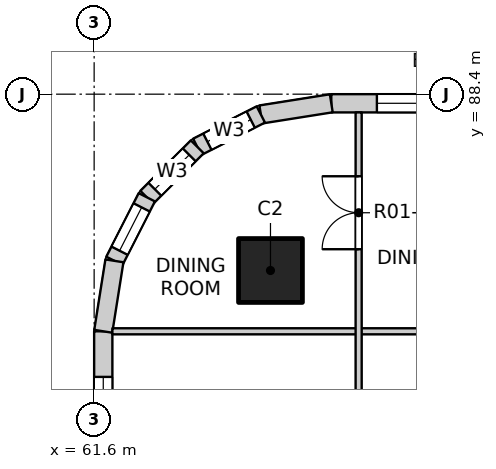
"""IFC4 building model, lengths in metres.
Left out: names, types, materials, properties, quantities, classifications, styles, units other than length and angle.
Written with IfcOpenShell. Run it as: python <this file> out.ifc"""

import sys

from ifc_helpers import new_model, si_unit, direction, frame, frame_2d, origin, origin_2d, place, context, subcontext, project, spatial, rectangle, extrude, element, fill, save


model = new_model("IFC4")
c1 = context("Model", 3, precision=1e-05, world=origin(), true_north=direction((0.0, 1.0)))
c2 = subcontext(c1, "Body", "Model", "MODEL_VIEW")
j1 = project(units=[si_unit("LENGTHUNIT", "METRE"), si_unit("PLANEANGLEUNIT", "RADIAN")], contexts=[c1])
p1 = place(None, origin())
s1 = spatial("IfcSite", under=j1, at=p1, CompositionType="ELEMENT")
p2 = place(p1, origin())
s2 = spatial("IfcBuilding", under=s1, at=p2, CompositionType="ELEMENT")
p3 = place(p2, frame((0.0, 0.0, 19.5)))
s3 = spatial("IfcBuildingStorey", under=s2, at=p3, CompositionType="ELEMENT", Elevation=19.5)
p4 = place(p3, frame((64.5, 85.5, -0.25), z_axis=(0.0, 0.0, 1.0), x_axis=(1.0, 0.0, 0.0)))
e1 = element("IfcColumn", 1, at=p4, inside=s3, PredefinedType="COLUMN", context=c2, shape_type="SweptSolid", body=[
    extrude(rectangle(XDim=1.05, YDim=1.05, at=origin_2d()), origin(), (0.0, 0.0, 1.0), 3.4),
])
p5 = place(p3, frame((65.5, 88.25, 0.0), z_axis=(0.0, 0.0, 1.0), x_axis=(1.0, 0.0, 0.0)))
e2 = element("IfcWall", 2, at=p5, inside=s3, PredefinedType="SOLIDWALL", context=c2, shape_type="SweptSolid", body=[
    extrude(rectangle(XDim=3.375, YDim=0.3, at=frame_2d((1.688, 0.0))), origin(), (0.0, 0.0, 1.0), 2.7),
])
p6 = place(p5, frame((0.75, 0.0, 0.9)))
e3 = element("IfcOpeningElement", 3, at=p6, cuts=e2, PredefinedType="OPENING", context=c2, shape_type="SweptSolid", body=[
    extrude(rectangle(XDim=2.4, YDim=1.8, at=frame_2d((1.2, 0.9))), frame((0.0, 0.16, 0.0), z_axis=(0.0, -1.0, 0.0), x_axis=(1.0, 0.0, 0.0)), (0.0, 0.0, 1.0), 0.32),
])
p7 = place(p3, frame((61.75, 81.125, 0.0), z_axis=(0.0, 0.0, 1.0), x_axis=(0.0, 1.0, 0.0)))
e4 = element("IfcWall", 4, at=p7, inside=s3, PredefinedType="SOLIDWALL", context=c2, shape_type="SweptSolid", body=[
    extrude(rectangle(XDim=3.375, YDim=0.3, at=frame_2d((1.688, 0.0))), origin(), (0.0, 0.0, 1.0), 2.7),
])
p8 = place(p7, frame((0.225, 0.0, 0.9)))
e5 = element("IfcOpeningElement", 5, at=p8, cuts=e4, PredefinedType="OPENING", context=c2, shape_type="SweptSolid", body=[
    extrude(rectangle(XDim=2.4, YDim=1.8, at=frame_2d((1.2, 0.9))), frame((0.0, 0.16, 0.0), z_axis=(0.0, -1.0, 0.0), x_axis=(1.0, 0.0, 0.0)), (0.0, 0.0, 1.0), 0.32),
])
p9 = place(p3, frame((65.5, 88.25, 0.0), z_axis=(0.0, 0.0, 1.0), x_axis=(-0.987678452879, -0.156496880861, 0.0)))
e6 = element("IfcWall", 6, at=p9, inside=s3, PredefinedType="SOLIDWALL", context=c2, shape_type="SweptSolid", body=[
    extrude(rectangle(XDim=1.173, YDim=0.3, at=frame_2d((0.586, 0.0))), origin(), (0.0, 0.0, 1.0), 2.7),
])
p10 = place(p3, frame((64.341, 88.066, 0.0), z_axis=(0.0, 0.0, 1.0), x_axis=(-0.890988677504, -0.454025524128, 0.0)))
e7 = element("IfcWall", 7, at=p10, inside=s3, PredefinedType="SOLIDWALL", context=c2, shape_type="SweptSolid", body=[
    extrude(rectangle(XDim=1.173, YDim=0.3, at=frame_2d((0.587, 0.0))), origin(), (0.0, 0.0, 1.0), 2.7),
])
p11 = place(p10, frame((0.187, 0.0, 0.9)))
e8 = element("IfcOpeningElement", 8, at=p11, cuts=e7, PredefinedType="OPENING", context=c2, shape_type="SweptSolid", body=[
    extrude(rectangle(XDim=0.8, YDim=1.2, at=frame_2d((0.4, 0.6))), frame((0.0, 0.16, 0.0), z_axis=(0.0, -1.0, 0.0), x_axis=(1.0, 0.0, 0.0)), (0.0, 0.0, 1.0), 0.32),
])
p12 = place(p3, frame((63.296, 87.534, 0.0), z_axis=(0.0, 0.0, 1.0), x_axis=(-0.707106781187, -0.707106781187, 0.0)))
e9 = element("IfcWall", 9, at=p12, inside=s3, PredefinedType="SOLIDWALL", context=c2, shape_type="SweptSolid", body=[
    extrude(rectangle(XDim=1.173, YDim=0.3, at=frame_2d((0.586, 0.0))), origin(), (0.0, 0.0, 1.0), 2.7),
])
p13 = place(p12, frame((0.187, 0.0, 0.9)))
e10 = element("IfcOpeningElement", 10, at=p13, cuts=e9, PredefinedType="OPENING", context=c2, shape_type="SweptSolid", body=[
    extrude(rectangle(XDim=0.8, YDim=1.2, at=frame_2d((0.4, 0.6))), frame((0.0, 0.16, 0.0), z_axis=(0.0, -1.0, 0.0), x_axis=(1.0, 0.0, 0.0)), (0.0, 0.0, 1.0), 0.32),
])
p14 = place(p3, frame((62.466, 86.704, 0.0), z_axis=(0.0, 0.0, 1.0), x_axis=(-0.454025524128, -0.890988677504, 0.0)))
e11 = element("IfcWall", 11, at=p14, inside=s3, PredefinedType="SOLIDWALL", context=c2, shape_type="SweptSolid", body=[
    extrude(rectangle(XDim=1.173, YDim=0.3, at=frame_2d((0.587, 0.0))), origin(), (0.0, 0.0, 1.0), 2.7),
])
p15 = place(p14, frame((0.187, 0.0, 0.9)))
e12 = element("IfcOpeningElement", 12, at=p15, cuts=e11, PredefinedType="OPENING", context=c2, shape_type="SweptSolid", body=[
    extrude(rectangle(XDim=0.8, YDim=1.2, at=frame_2d((0.4, 0.6))), frame((0.0, 0.16, 0.0), z_axis=(0.0, -1.0, 0.0), x_axis=(1.0, 0.0, 0.0)), (0.0, 0.0, 1.0), 0.32),
])
p16 = place(p3, frame((61.934, 85.659, 0.0), z_axis=(0.0, 0.0, 1.0), x_axis=(-0.156496880861, -0.987678452879, 0.0)))
e13 = element("IfcWall", 13, at=p16, inside=s3, PredefinedType="SOLIDWALL", context=c2, shape_type="SweptSolid", body=[
    extrude(rectangle(XDim=1.173, YDim=0.3, at=frame_2d((0.586, 0.0))), origin(), (0.0, 0.0, 1.0), 2.7),
])
p17 = place(p3, frame((61.9, 84.5, 0.0), z_axis=(0.0, 0.0, 1.0), x_axis=(1.0, 0.0, 0.0)))
e14 = element("IfcWall", 14, at=p17, inside=s3, PredefinedType="PARTITIONING", context=c2, shape_type="SweptSolid", body=[
    extrude(rectangle(XDim=11.5, YDim=0.1, at=frame_2d((5.75, 0.0))), origin(), (0.0, 0.0, 1.0), 3.15),
])
p18 = place(p17, frame((7.965, 0.0, 0.0)))
e15 = element("IfcOpeningElement", 15, at=p18, cuts=e14, PredefinedType="OPENING", context=c2, shape_type="SweptSolid", body=[
    extrude(rectangle(XDim=0.9, YDim=2.1, at=frame_2d((0.45, 1.05))), frame((0.0, 0.06, 0.0), z_axis=(0.0, -1.0, 0.0), x_axis=(1.0, 0.0, 0.0)), (0.0, 0.0, 1.0), 0.12),
])
p19 = place(p3, frame((65.95, 76.8, 0.0), z_axis=(0.0, 0.0, 1.0), x_axis=(0.0, 1.0, 0.0)))
e16 = element("IfcWall", 16, at=p19, inside=s3, PredefinedType="PARTITIONING", context=c2, shape_type="SweptSolid", body=[
    extrude(rectangle(XDim=11.3, YDim=0.1, at=frame_2d((5.65, 0.0))), origin(), (0.0, 0.0, 1.0), 3.15),
])
p20 = place(p19, frame((0.425, 0.0, 0.0)))
e17 = element("IfcOpeningElement", 17, at=p20, cuts=e16, PredefinedType="OPENING", context=c2, shape_type="SweptSolid", body=[
    extrude(rectangle(XDim=0.9, YDim=2.1, at=frame_2d((0.45, 1.05))), frame((0.0, 0.06, 0.0), z_axis=(0.0, -1.0, 0.0), x_axis=(1.0, 0.0, 0.0)), (0.0, 0.0, 1.0), 0.12),
])
p21 = place(p19, frame((2.375, 0.0, 0.0)))
e18 = element("IfcOpeningElement", 18, at=p21, cuts=e16, PredefinedType="OPENING", context=c2, shape_type="SweptSolid", body=[
    extrude(rectangle(XDim=0.9, YDim=2.1, at=frame_2d((0.45, 1.05))), frame((0.0, 0.06, 0.0), z_axis=(0.0, -1.0, 0.0), x_axis=(1.0, 0.0, 0.0)), (0.0, 0.0, 1.0), 0.12),
])
p22 = place(p19, frame((5.15, 0.0, 0.0)))
e19 = element("IfcOpeningElement", 19, at=p22, cuts=e16, PredefinedType="OPENING", context=c2, shape_type="SweptSolid", body=[
    extrude(rectangle(XDim=1.2, YDim=2.1, at=frame_2d((0.6, 1.05))), frame((0.0, 0.06, 0.0), z_axis=(0.0, -1.0, 0.0), x_axis=(1.0, 0.0, 0.0)), (0.0, 0.0, 1.0), 0.12),
])
p23 = place(p19, frame((9.05, 0.0, 0.0)))
e20 = element("IfcOpeningElement", 20, at=p23, cuts=e16, PredefinedType="OPENING", context=c2, shape_type="SweptSolid", body=[
    extrude(rectangle(XDim=1.2, YDim=2.1, at=frame_2d((0.6, 1.05))), frame((0.0, 0.06, 0.0), z_axis=(0.0, -1.0, 0.0), x_axis=(1.0, 0.0, 0.0)), (0.0, 0.0, 1.0), 0.12),
])
p24 = place(p6, origin())
e21 = element("IfcWindow", 21, at=p24, inside=s3, PartitioningType="DOUBLE_PANEL_VERTICAL", PredefinedType="WINDOW", context=c2, shape_type="SweptSolid", body=[
    extrude(rectangle(XDim=2.4, YDim=1.8, at=frame_2d((1.2, 0.9))), frame((0.0, 0.03, 0.0), z_axis=(0.0, -1.0, 0.0), x_axis=(1.0, 0.0, 0.0)), (0.0, 0.0, 1.0), 0.06),
])
fill(e3, e21)
p25 = place(p8, origin())
e22 = element("IfcWindow", 22, at=p25, inside=s3, PartitioningType="DOUBLE_PANEL_VERTICAL", PredefinedType="WINDOW", context=c2, shape_type="SweptSolid", body=[
    extrude(rectangle(XDim=2.4, YDim=1.8, at=frame_2d((1.2, 0.9))), frame((0.0, 0.03, 0.0), z_axis=(0.0, -1.0, 0.0), x_axis=(1.0, 0.0, 0.0)), (0.0, 0.0, 1.0), 0.06),
])
fill(e5, e22)
p26 = place(p11, origin())
e23 = element("IfcWindow", 23, at=p26, inside=s3, PartitioningType="SINGLE_PANEL", PredefinedType="WINDOW", context=c2, shape_type="SweptSolid", body=[
    extrude(rectangle(XDim=0.8, YDim=1.2, at=frame_2d((0.4, 0.6))), frame((0.0, 0.03, 0.0), z_axis=(0.0, -1.0, 0.0), x_axis=(1.0, 0.0, 0.0)), (0.0, 0.0, 1.0), 0.06),
])
fill(e8, e23)
p27 = place(p13, origin())
e24 = element("IfcWindow", 24, at=p27, inside=s3, PartitioningType="SINGLE_PANEL", PredefinedType="WINDOW", context=c2, shape_type="SweptSolid", body=[
    extrude(rectangle(XDim=0.8, YDim=1.2, at=frame_2d((0.4, 0.6))), frame((0.0, 0.03, 0.0), z_axis=(0.0, -1.0, 0.0), x_axis=(1.0, 0.0, 0.0)), (0.0, 0.0, 1.0), 0.06),
])
fill(e10, e24)
p28 = place(p15, origin())
e25 = element("IfcWindow", 25, at=p28, inside=s3, PartitioningType="SINGLE_PANEL", PredefinedType="WINDOW", context=c2, shape_type="SweptSolid", body=[
    extrude(rectangle(XDim=0.8, YDim=1.2, at=frame_2d((0.4, 0.6))), frame((0.0, 0.03, 0.0), z_axis=(0.0, -1.0, 0.0), x_axis=(1.0, 0.0, 0.0)), (0.0, 0.0, 1.0), 0.06),
])
fill(e12, e25)
p29 = place(p23, origin())
e26 = element("IfcDoor", 26, at=p29, inside=s3, OperationType="DOUBLE_DOOR_SINGLE_SWING", PredefinedType="DOOR", context=c2, shape_type="SweptSolid", body=[
    extrude(rectangle(XDim=1.2, YDim=2.1, at=frame_2d((0.6, 1.05))), frame((0.0, 0.025, 0.0), z_axis=(0.0, -1.0, 0.0), x_axis=(1.0, 0.0, 0.0)), (0.0, 0.0, 1.0), 0.05),
])
fill(e20, e26)
save(model, sys.argv[1])
